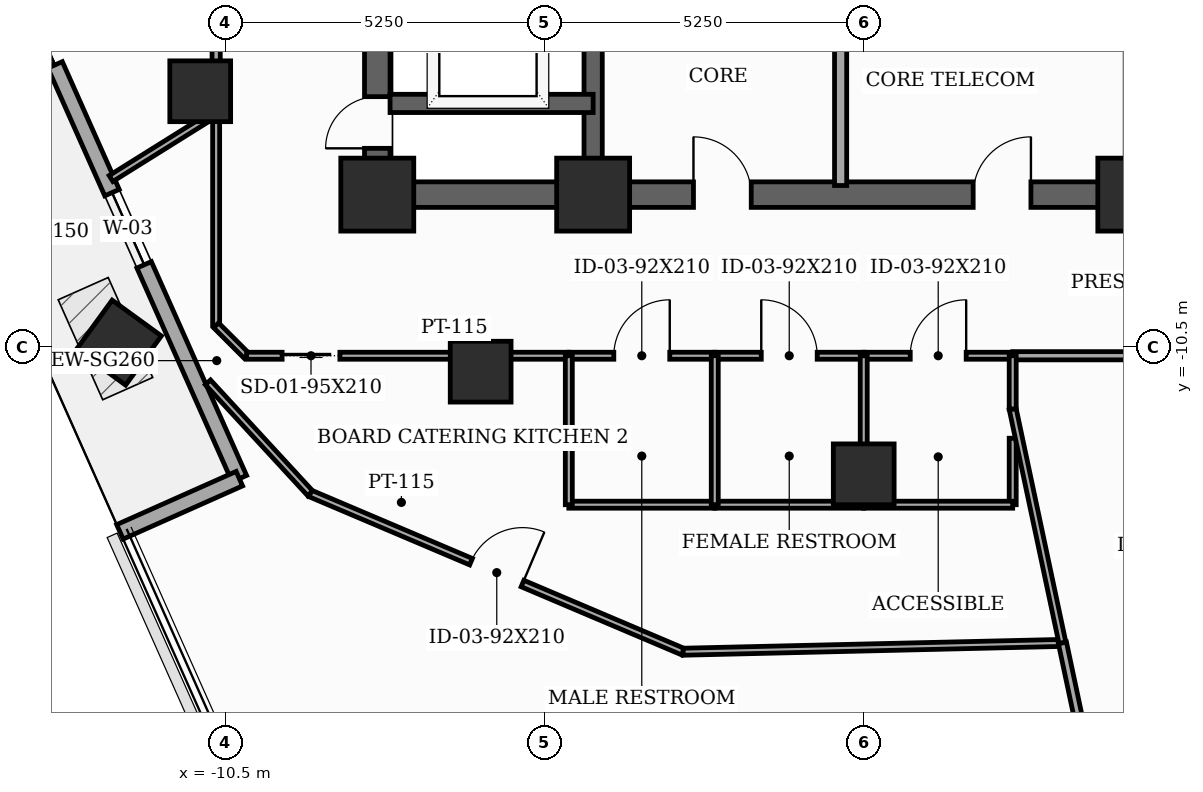
"""IFC4 building model, lengths in metres.
Left out: names, types, materials, properties, quantities, classifications, styles, units other than length and angle.
Written with IfcOpenShell. Run it as: python <this file> out.ifc"""

import sys

from ifc_helpers import new_model, si_unit, direction, frame, frame_2d, origin, origin_2d, place, context, subcontext, project, spatial, rectangle, extrude, element, fill, save


model = new_model("IFC4")
c1 = context("Model", 3, precision=1e-05, world=origin(), true_north=direction((0.0, 1.0)))
c2 = subcontext(c1, "Body", "Model", "MODEL_VIEW")
j1 = project(units=[si_unit("LENGTHUNIT", "METRE"), si_unit("PLANEANGLEUNIT", "RADIAN")], contexts=[c1])
p1 = place(None, origin())
s1 = spatial("IfcSite", under=j1, at=p1, CompositionType="ELEMENT")
p2 = place(p1, origin())
s2 = spatial("IfcBuilding", under=s1, at=p2, CompositionType="ELEMENT")
p3 = place(p2, frame((0.0, 0.0, 226.3)))
s3 = spatial("IfcBuildingStorey", under=s2, at=p3, CompositionType="ELEMENT", Elevation=226.3)
for number, where, z_axis, x_axis in (
    (1, (-8.0, -8.0, 0.0), (0.0, 0.0, 1.0), (1.0, 0.0, 0.0)),
    (2, (-4.45, -8.0, 0.0), (0.0, 0.0, 1.0), (1.0, 0.0, 0.0)),
    (3, (4.45, -8.0, 0.0), (0.0, 0.0, 1.0), (1.0, 0.0, 0.0)),
):
    element("IfcColumn", number, at=place(p3, frame(where, z_axis=z_axis, x_axis=x_axis)), inside=s3, PredefinedType="COLUMN", context=c2, shape_type="SweptSolid", body=[
        extrude(rectangle(XDim=1.2, YDim=1.2, at=origin_2d()), origin(), (0.0, 0.0, 1.0), 3.7),
    ])
for number, where, z_axis, x_axis in (
    (4, (-10.912, -6.3, 0.0), (0.0, 0.0, 1.0), (1.0, 0.0, 0.0)),
    (5, (-6.3, -10.912, 0.0), (0.0, 0.0, 1.0), (1.0, 0.0, 0.0)),
    (6, (0.0, -12.6, 0.0), (0.0, 0.0, 1.0), (1.0, 0.0, 0.0)),
    (7, (-12.25, -10.435, 0.0), (0.0, 0.0, 1.0), (0.588, 0.809, 0.0)),
):
    element("IfcColumn", number, at=place(p3, frame(where, z_axis=z_axis, x_axis=x_axis)), inside=s3, PredefinedType="COLUMN", context=c2, shape_type="SweptSolid", body=[
        extrude(rectangle(XDim=1.0, YDim=1.0, at=origin_2d()), origin(), (0.0, 0.0, 1.0), 3.7),
    ])
p4 = place(p3, frame((-14.661, -2.806, 0.0), z_axis=(0.0, 0.0, 1.0), x_axis=(0.406736136359, -0.913545683247, 0.0)))
e8 = element("IfcWall", 8, at=p4, inside=s3, PredefinedType="SOLIDWALL", context=c2, shape_type="SweptSolid", body=[
    extrude(rectangle(XDim=10.8, YDim=0.26, at=frame_2d((5.4, 0.0))), origin(), (0.0, 0.0, 1.0), 3.5),
])
p5 = place(p4, frame((1.75, 0.0, 0.0)))
e9 = element("IfcOpeningElement", 9, at=p5, cuts=e8, PredefinedType="OPENING", context=c2, shape_type="SweptSolid", body=[
    extrude(rectangle(XDim=1.6, YDim=2.08, at=frame_2d((0.8, 1.04))), frame((0.0, 0.14, 0.0), z_axis=(0.0, -1.0, 0.0), x_axis=(1.0, 0.0, 0.0)), (0.0, 0.0, 1.0), 0.28),
])
p6 = place(p4, frame((5.65, 0.0, 0.85)))
e10 = element("IfcOpeningElement", 10, at=p6, cuts=e8, PredefinedType="OPENING", context=c2, shape_type="SweptSolid", body=[
    extrude(rectangle(XDim=1.3, YDim=1.25, at=frame_2d((0.65, 0.625))), frame((0.0, 0.14, 0.0), z_axis=(0.0, -1.0, 0.0), x_axis=(1.0, 0.0, 0.0)), (0.0, 0.0, 1.0), 0.28),
])
p7 = place(p3, frame((-10.268, -12.672, 0.0), z_axis=(0.0, 0.0, 1.0), x_axis=(-0.913539751874, -0.406749458199, 0.0)))
e11 = element("IfcWall", 11, at=p7, inside=s3, PredefinedType="SOLIDWALL", context=c2, shape_type="SweptSolid", body=[
    extrude(rectangle(XDim=2.15, YDim=0.26, at=frame_2d((1.075, 0.0))), origin(), (0.0, 0.0, 1.0), 3.5),
])
p8 = place(p3, frame((-8.0, -8.0, 0.0), z_axis=(0.0, 0.0, 1.0), x_axis=(0.0, 1.0, 0.0)))
e12 = element("IfcWall", 12, at=p8, inside=s3, PredefinedType="SHEAR", context=c2, shape_type="SweptSolid", body=[
    extrude(rectangle(XDim=16.0, YDim=0.42, at=frame_2d((8.0, 0.0))), origin(), (0.0, 0.0, 1.0), 3.5),
])
p9 = place(p8, frame((0.761, 0.0, 0.0)))
e13 = element("IfcOpeningElement", 13, at=p9, cuts=e12, PredefinedType="OPENING", context=c2, shape_type="SweptSolid", body=[
    extrude(rectangle(XDim=0.85, YDim=2.02, at=frame_2d((0.425, 1.01))), frame((0.0, 0.22, 0.0), z_axis=(0.0, -1.0, 0.0), x_axis=(1.0, 0.0, 0.0)), (0.0, 0.0, 1.0), 0.44),
])
p10 = place(p8, frame((5.35, 0.0, 0.0)))
e14 = element("IfcOpeningElement", 14, at=p10, cuts=e12, PredefinedType="OPENING", context=c2, shape_type="SweptSolid", body=[
    extrude(rectangle(XDim=1.05, YDim=2.15, at=frame_2d((0.525, 1.075))), frame((0.0, 0.22, 0.0), z_axis=(0.0, -1.0, 0.0), x_axis=(1.0, 0.0, 0.0)), (0.0, 0.0, 1.0), 0.44),
])
p11 = place(p3, frame((-8.0, -8.0, 0.0), z_axis=(0.0, 0.0, 1.0), x_axis=(1.0, 0.0, 0.0)))
e15 = element("IfcWall", 15, at=p11, inside=s3, PredefinedType="SHEAR", context=c2, shape_type="SweptSolid", body=[
    extrude(rectangle(XDim=16.0, YDim=0.42, at=frame_2d((8.0, 0.0))), origin(), (0.0, 0.0, 1.0), 3.5),
])
p12 = place(p11, frame((5.2, 0.0, 0.0)))
e16 = element("IfcOpeningElement", 16, at=p12, cuts=e15, PredefinedType="OPENING", context=c2, shape_type="SweptSolid", body=[
    extrude(rectangle(XDim=0.95, YDim=2.1, at=frame_2d((0.475, 1.05))), frame((0.0, 0.22, 0.0), z_axis=(0.0, -1.0, 0.0), x_axis=(1.0, 0.0, 0.0)), (0.0, 0.0, 1.0), 0.44),
])
p13 = place(p11, frame((9.8, 0.0, 0.0)))
e17 = element("IfcOpeningElement", 17, at=p13, cuts=e15, PredefinedType="OPENING", context=c2, shape_type="SweptSolid", body=[
    extrude(rectangle(XDim=0.95, YDim=2.1, at=frame_2d((0.475, 1.05))), frame((0.0, 0.22, 0.0), z_axis=(0.0, -1.0, 0.0), x_axis=(1.0, 0.0, 0.0)), (0.0, 0.0, 1.0), 0.44),
])
p14 = place(p3, frame((-4.45, -7.79, 0.0), z_axis=(0.0, 0.0, 1.0), x_axis=(0.0, 1.0, 0.0)))
e18 = element("IfcWall", 18, at=p14, inside=s3, PredefinedType="SHEAR", context=c2, shape_type="SweptSolid", body=[
    extrude(rectangle(XDim=15.58, YDim=0.3, at=frame_2d((7.79, 0.0))), origin(), (0.0, 0.0, 1.0), 3.5),
])
p15 = place(p3, frame((-7.79, -6.5, 0.0), z_axis=(0.0, 0.0, 1.0), x_axis=(1.0, 0.0, 0.0)))
e19 = element("IfcWall", 19, at=p15, inside=s3, PredefinedType="SHEAR", context=c2, shape_type="SweptSolid", body=[
    extrude(rectangle(XDim=3.34, YDim=0.3, at=frame_2d((1.67, 0.0))), origin(), (0.0, 0.0, 1.0), 3.5),
])
p16 = place(p3, frame((-0.38, -7.85, 0.0), z_axis=(0.0, 0.0, 1.0), x_axis=(0.0, 1.0, 0.0)))
e20 = element("IfcWall", 20, at=p16, inside=s3, PredefinedType="SOLIDWALL", context=c2, shape_type="SweptSolid", body=[
    extrude(rectangle(XDim=2.95, YDim=0.2, at=frame_2d((1.475, 0.0))), origin(), (0.0, 0.0, 1.0), 2.885),
])
p17 = place(p3, frame((-10.65, -6.655, 0.0), z_axis=(0.0, 0.0, 1.0), x_axis=(0.0, -1.0, 0.0)))
e21 = element("IfcWall", 21, at=p17, inside=s3, PredefinedType="PARTITIONING", context=c2, shape_type="SweptSolid", body=[
    extrude(rectangle(XDim=3.495, YDim=0.115, at=frame_2d((1.748, 0.0))), origin(), (0.0, 0.0, 1.0), 2.885),
])
p18 = place(p3, frame((-10.65, -10.15, 0.0), z_axis=(0.0, 0.0, 1.0), x_axis=(0.707106781187, -0.707106781187, 0.0)))
e22 = element("IfcWall", 22, at=p18, inside=s3, PredefinedType="PARTITIONING", context=c2, shape_type="SweptSolid", body=[
    extrude(rectangle(XDim=0.707, YDim=0.115, at=frame_2d((0.354, 0.0))), origin(), (0.0, 0.0, 1.0), 3.5),
])
p19 = place(p3, frame((-10.15, -10.65, 0.0), z_axis=(0.0, 0.0, 1.0), x_axis=(1.0, 0.0, 0.0)))
e23 = element("IfcWall", 23, at=p19, inside=s3, PredefinedType="PARTITIONING", context=c2, shape_type="SweptSolid", body=[
    extrude(rectangle(XDim=5.3, YDim=0.115, at=frame_2d((2.65, 0.0))), origin(), (0.0, 0.0, 1.0), 2.885),
])
p20 = place(p19, frame((0.585, 0.0, 0.0)))
e24 = element("IfcOpeningElement", 24, at=p20, cuts=e23, PredefinedType="OPENING", context=c2, shape_type="SweptSolid", body=[
    extrude(rectangle(XDim=0.95, YDim=2.1, at=frame_2d((0.475, 1.05))), frame((0.0, 0.067, 0.0), z_axis=(0.0, -1.0, 0.0), x_axis=(1.0, 0.0, 0.0)), (0.0, 0.0, 1.0), 0.135),
])
p21 = place(p3, frame((-4.85, -10.65, 0.0), z_axis=(0.0, 0.0, 1.0), x_axis=(1.0, 0.0, 0.0)))
e25 = element("IfcWall", 25, at=p21, inside=s3, PredefinedType="PARTITIONING", context=c2, shape_type="SweptSolid", body=[
    extrude(rectangle(XDim=2.4, YDim=0.115, at=frame_2d((1.2, 0.0))), origin(), (0.0, 0.0, 1.0), 3.5),
])
p22 = place(p21, frame((0.74, 0.0, 0.0)))
e26 = element("IfcOpeningElement", 26, at=p22, cuts=e25, PredefinedType="OPENING", context=c2, shape_type="SweptSolid", body=[
    extrude(rectangle(XDim=0.92, YDim=2.1, at=frame_2d((0.46, 1.05))), frame((0.0, 0.067, 0.0), z_axis=(0.0, -1.0, 0.0), x_axis=(1.0, 0.0, 0.0)), (0.0, 0.0, 1.0), 0.135),
])
p23 = place(p3, frame((-2.45, -10.65, 0.0), z_axis=(0.0, 0.0, 1.0), x_axis=(1.0, 0.0, 0.0)))
e27 = element("IfcWall", 27, at=p23, inside=s3, PredefinedType="PARTITIONING", context=c2, shape_type="SweptSolid", body=[
    extrude(rectangle(XDim=2.45, YDim=0.115, at=frame_2d((1.225, 0.0))), origin(), (0.0, 0.0, 1.0), 2.885),
])
p24 = place(p23, frame((0.765, 0.0, 0.0)))
e28 = element("IfcOpeningElement", 28, at=p24, cuts=e27, PredefinedType="OPENING", context=c2, shape_type="SweptSolid", body=[
    extrude(rectangle(XDim=0.92, YDim=2.1, at=frame_2d((0.46, 1.05))), frame((0.0, 0.067, 0.0), z_axis=(0.0, -1.0, 0.0), x_axis=(1.0, 0.0, 0.0)), (0.0, 0.0, 1.0), 0.135),
])
p25 = place(p3, frame((0.0, -10.65, 0.0), z_axis=(0.0, 0.0, 1.0), x_axis=(1.0, 0.0, 0.0)))
e29 = element("IfcWall", 29, at=p25, inside=s3, PredefinedType="PARTITIONING", context=c2, shape_type="SweptSolid", body=[
    extrude(rectangle(XDim=2.45, YDim=0.115, at=frame_2d((1.225, 0.0))), origin(), (0.0, 0.0, 1.0), 3.5),
])
p26 = place(p25, frame((0.765, 0.0, 0.0)))
e30 = element("IfcOpeningElement", 30, at=p26, cuts=e29, PredefinedType="OPENING", context=c2, shape_type="SweptSolid", body=[
    extrude(rectangle(XDim=0.92, YDim=2.1, at=frame_2d((0.46, 1.05))), frame((0.0, 0.067, 0.0), z_axis=(0.0, -1.0, 0.0), x_axis=(1.0, 0.0, 0.0)), (0.0, 0.0, 1.0), 0.135),
])
p27 = place(p3, frame((2.45, -10.65, 0.0), z_axis=(0.0, 0.0, 1.0), x_axis=(1.0, 0.0, 0.0)))
e31 = element("IfcWall", 31, at=p27, inside=s3, PredefinedType="PARTITIONING", context=c2, shape_type="SweptSolid", body=[
    extrude(rectangle(XDim=7.7, YDim=0.135, at=frame_2d((3.85, 0.0))), origin(), (0.0, 0.0, 1.0), 2.885),
])
p28 = place(p3, frame((-10.65, -1.35, 0.0), z_axis=(0.0, 0.0, 1.0), x_axis=(0.0, -1.0, 0.0)))
e32 = element("IfcWall", 32, at=p28, inside=s3, PredefinedType="PARTITIONING", context=c2, shape_type="SweptSolid", body=[
    extrude(rectangle(XDim=5.305, YDim=0.135, at=frame_2d((2.652, 0.0))), origin(), (0.0, 0.0, 1.0), 2.885),
])
p29 = place(p28, frame((1.216, 0.0, 0.0)))
e33 = element("IfcOpeningElement", 33, at=p29, cuts=e32, PredefinedType="OPENING", context=c2, shape_type="SweptSolid", body=[
    extrude(rectangle(XDim=1.6, YDim=2.15, at=frame_2d((0.8, 1.075))), frame((0.0, 0.077, 0.0), z_axis=(0.0, -1.0, 0.0), x_axis=(1.0, 0.0, 0.0)), (0.0, 0.0, 1.0), 0.155),
])
p30 = place(p3, frame((-2.45, -13.1, 0.0), z_axis=(0.0, 0.0, 1.0), x_axis=(-1.0, 0.0, 0.0)))
e34 = element("IfcWall", 34, at=p30, inside=s3, PredefinedType="PARTITIONING", context=c2, shape_type="SweptSolid", body=[
    extrude(rectangle(XDim=2.4, YDim=0.115, at=frame_2d((1.2, 0.0))), origin(), (0.0, 0.0, 1.0), 3.5),
])
p31 = place(p3, frame((-4.85, -13.1, 0.0), z_axis=(0.0, 0.0, 1.0), x_axis=(0.0, 1.0, 0.0)))
e35 = element("IfcWall", 35, at=p31, inside=s3, PredefinedType="PARTITIONING", context=c2, shape_type="SweptSolid", body=[
    extrude(rectangle(XDim=2.45, YDim=0.115, at=frame_2d((1.225, 0.0))), origin(), (0.0, 0.0, 1.0), 2.885),
])
p32 = place(p3, frame((-10.785, -11.087, 0.0), z_axis=(0.0, 0.0, 1.0), x_axis=(0.677598765999, -0.735431786311, 0.0)))
e36 = element("IfcWall", 36, at=p32, inside=s3, PredefinedType="PARTITIONING", context=c2, shape_type="SweptSolid", body=[
    extrude(rectangle(XDim=2.486, YDim=0.115, at=frame_2d((1.243, 0.0))), origin(), (0.0, 0.0, 1.0), 3.5),
])
p33 = place(p3, frame((-9.1, -12.916, 0.0), z_axis=(0.0, 0.0, 1.0), x_axis=(0.920506675175, -0.390726836752, 0.0)))
e37 = element("IfcWall", 37, at=p33, inside=s3, PredefinedType="PARTITIONING", context=c2, shape_type="SweptSolid", body=[
    extrude(rectangle(XDim=6.659, YDim=0.115, at=frame_2d((3.33, 0.0))), origin(), (0.0, 0.0, 1.0), 2.985),
])
p34 = place(p33, frame((2.87, 0.0, 0.0)))
e38 = element("IfcOpeningElement", 38, at=p34, cuts=e37, PredefinedType="OPENING", context=c2, shape_type="SweptSolid", body=[
    extrude(rectangle(XDim=0.92, YDim=2.1, at=frame_2d((0.46, 1.05))), frame((0.0, 0.067, 0.0), z_axis=(0.0, -1.0, 0.0), x_axis=(1.0, 0.0, 0.0)), (0.0, 0.0, 1.0), 0.135),
])
p35 = place(p3, frame((-2.97, -15.518, 0.0), z_axis=(0.0, 0.0, 1.0), x_axis=(0.99972988351, 0.023241342836, 0.0)))
e39 = element("IfcWall", 39, at=p35, inside=s3, PredefinedType="PARTITIONING", context=c2, shape_type="SweptSolid", body=[
    extrude(rectangle(XDim=6.24, YDim=0.115, at=frame_2d((3.12, 0.0))), origin(), (0.0, 0.0, 1.0), 2.985),
])
p36 = place(p3, frame((0.0, -13.1, 0.0), z_axis=(0.0, 0.0, 1.0), x_axis=(-1.0, 0.0, 0.0)))
e40 = element("IfcWall", 40, at=p36, inside=s3, PredefinedType="PARTITIONING", context=c2, shape_type="SweptSolid", body=[
    extrude(rectangle(XDim=2.45, YDim=0.115, at=frame_2d((1.225, 0.0))), origin(), (0.0, 0.0, 1.0), 3.5),
])
p37 = place(p3, frame((2.45, -12.007, 0.0), z_axis=(0.0, 0.0, 1.0), x_axis=(0.0, -1.0, 0.0)))
e41 = element("IfcWall", 41, at=p37, inside=s3, PredefinedType="PARTITIONING", context=c2, shape_type="SweptSolid", body=[
    extrude(rectangle(XDim=1.093, YDim=0.115, at=frame_2d((0.547, 0.0))), origin(), (0.0, 0.0, 1.0), 2.885),
])
p38 = place(p3, frame((2.45, -13.1, 0.0), z_axis=(0.0, 0.0, 1.0), x_axis=(-1.0, 0.0, 0.0)))
e42 = element("IfcWall", 42, at=p38, inside=s3, PredefinedType="PARTITIONING", context=c2, shape_type="SweptSolid", body=[
    extrude(rectangle(XDim=2.45, YDim=0.115, at=frame_2d((1.225, 0.0))), origin(), (0.0, 0.0, 1.0), 2.985),
])
p39 = place(p3, frame((3.268, -15.373, 0.0), z_axis=(0.0, 0.0, 1.0), x_axis=(-0.208002774368, 0.978128235895, 0.0)))
e43 = element("IfcWall", 43, at=p39, inside=s3, PredefinedType="PARTITIONING", context=c2, shape_type="SweptSolid", body=[
    extrude(rectangle(XDim=3.933, YDim=0.115, at=frame_2d((1.967, 0.0))), origin(), (0.0, 0.0, 1.0), 2.885),
])
p40 = place(p3, frame((-10.65, -6.655, 0.0), z_axis=(0.0, 0.0, 1.0), x_axis=(-0.848119384497, -0.529805161962, 0.0)))
e44 = element("IfcWall", 44, at=p40, inside=s3, PredefinedType="PARTITIONING", context=c2, shape_type="SweptSolid", body=[
    extrude(rectangle(XDim=2.039, YDim=0.115, at=frame_2d((1.019, 0.0))), origin(), (0.0, 0.0, 1.0), 2.885),
])
p41 = place(p3, frame((-2.45, -13.1, 0.0), z_axis=(0.0, 0.0, 1.0), x_axis=(0.0, 1.0, 0.0)))
e45 = element("IfcWall", 45, at=p41, inside=s3, PredefinedType="PARTITIONING", context=c2, shape_type="SweptSolid", body=[
    extrude(rectangle(XDim=2.45, YDim=0.115, at=frame_2d((1.225, 0.0))), origin(), (0.0, 0.0, 1.0), 2.885),
])
p42 = place(p3, frame((4.645, -21.856, 0.0), z_axis=(0.0, 0.0, 1.0), x_axis=(-0.207797956892, 0.978171768715, 0.0)))
e46 = element("IfcWall", 46, at=p42, inside=s3, PredefinedType="PARTITIONING", context=c2, shape_type="SweptSolid", body=[
    extrude(rectangle(XDim=6.628, YDim=0.135, at=frame_2d((3.314, 0.0))), origin(), (0.0, 0.0, 1.0), 2.985),
])
p43 = place(p3, frame((0.0, -13.1, 0.0), z_axis=(0.0, 0.0, 1.0), x_axis=(0.0, 1.0, 0.0)))
e47 = element("IfcWall", 47, at=p43, inside=s3, PredefinedType="PARTITIONING", context=c2, shape_type="SweptSolid", body=[
    extrude(rectangle(XDim=2.45, YDim=0.115, at=frame_2d((1.225, 0.0))), origin(), (0.0, 0.0, 1.0), 2.885),
])
p44 = place(p3, frame((2.45, -11.526, 0.0), z_axis=(0.0, 0.0, 1.0), x_axis=(0.0, 1.0, 0.0)))
e48 = element("IfcWall", 48, at=p44, inside=s3, PredefinedType="PARTITIONING", context=c2, shape_type="SweptSolid", body=[
    extrude(rectangle(XDim=0.876, YDim=0.115, at=frame_2d((0.438, 0.0))), origin(), (0.0, 0.0, 1.0), 3.5),
])
p45 = place(p5, frame((1.6, 0.0, 0.0), z_axis=(0.0, 0.0, 1.0), x_axis=(-1.0, 0.0, 0.0)))
e49 = element("IfcDoor", 49, at=p45, inside=s3, OperationType="DOUBLE_DOOR_SLIDING", PredefinedType="DOOR", context=c2, shape_type="SweptSolid", body=[
    extrude(rectangle(XDim=1.6, YDim=2.08, at=frame_2d((0.8, 1.04))), frame((0.0, 0.025, 0.0), z_axis=(0.0, -1.0, 0.0), x_axis=(1.0, 0.0, 0.0)), (0.0, 0.0, 1.0), 0.05),
])
fill(e9, e49)
p46 = place(p6, origin())
e50 = element("IfcWindow", 50, at=p46, inside=s3, PartitioningType="SINGLE_PANEL", PredefinedType="WINDOW", context=c2, shape_type="SweptSolid", body=[
    extrude(rectangle(XDim=1.3, YDim=1.25, at=frame_2d((0.65, 0.625))), frame((0.0, 0.03, 0.0), z_axis=(0.0, -1.0, 0.0), x_axis=(1.0, 0.0, 0.0)), (0.0, 0.0, 1.0), 0.06),
])
fill(e10, e50)
p47 = place(p9, origin())
e51 = element("IfcDoor", 51, at=p47, inside=s3, OperationType="SINGLE_SWING_LEFT", PredefinedType="TRAPDOOR", context=c2, shape_type="SweptSolid", body=[
    extrude(rectangle(XDim=0.85, YDim=2.02, at=frame_2d((0.425, 1.01))), frame((0.0, 0.025, 0.0), z_axis=(0.0, -1.0, 0.0), x_axis=(1.0, 0.0, 0.0)), (0.0, 0.0, 1.0), 0.05),
])
fill(e13, e51)
p48 = place(p12, origin())
e52 = element("IfcDoor", 52, at=p48, inside=s3, OperationType="SINGLE_SWING_LEFT", PredefinedType="DOOR", context=c2, shape_type="SweptSolid", body=[
    extrude(rectangle(XDim=0.95, YDim=2.1, at=frame_2d((0.475, 1.05))), frame((0.0, 0.025, 0.0), z_axis=(0.0, -1.0, 0.0), x_axis=(1.0, 0.0, 0.0)), (0.0, 0.0, 1.0), 0.05),
])
fill(e16, e52)
p49 = place(p13, origin())
e53 = element("IfcDoor", 53, at=p49, inside=s3, OperationType="SINGLE_SWING_RIGHT", PredefinedType="DOOR", context=c2, shape_type="SweptSolid", body=[
    extrude(rectangle(XDim=0.95, YDim=2.1, at=frame_2d((0.475, 1.05))), frame((0.0, 0.025, 0.0), z_axis=(0.0, -1.0, 0.0), x_axis=(1.0, 0.0, 0.0)), (0.0, 0.0, 1.0), 0.05),
])
fill(e17, e53)
p50 = place(p20, origin())
e54 = element("IfcDoor", 54, at=p50, inside=s3, OperationType="SLIDING_TO_LEFT", PredefinedType="DOOR", context=c2, shape_type="SweptSolid", body=[
    extrude(rectangle(XDim=0.95, YDim=2.1, at=frame_2d((0.475, 1.05))), frame((0.0, 0.025, 0.0), z_axis=(0.0, -1.0, 0.0), x_axis=(1.0, 0.0, 0.0)), (0.0, 0.0, 1.0), 0.05),
])
fill(e24, e54)
p51 = place(p22, origin())
e55 = element("IfcDoor", 55, at=p51, inside=s3, OperationType="SINGLE_SWING_RIGHT", PredefinedType="DOOR", context=c2, shape_type="SweptSolid", body=[
    extrude(rectangle(XDim=0.92, YDim=2.1, at=frame_2d((0.46, 1.05))), frame((0.0, 0.025, 0.0), z_axis=(0.0, -1.0, 0.0), x_axis=(1.0, 0.0, 0.0)), (0.0, 0.0, 1.0), 0.05),
])
fill(e26, e55)
p52 = place(p24, origin())
e56 = element("IfcDoor", 56, at=p52, inside=s3, OperationType="SINGLE_SWING_LEFT", PredefinedType="DOOR", context=c2, shape_type="SweptSolid", body=[
    extrude(rectangle(XDim=0.92, YDim=2.1, at=frame_2d((0.46, 1.05))), frame((0.0, 0.025, 0.0), z_axis=(0.0, -1.0, 0.0), x_axis=(1.0, 0.0, 0.0)), (0.0, 0.0, 1.0), 0.05),
])
fill(e28, e56)
p53 = place(p26, origin())
e57 = element("IfcDoor", 57, at=p53, inside=s3, OperationType="SINGLE_SWING_RIGHT", PredefinedType="DOOR", context=c2, shape_type="SweptSolid", body=[
    extrude(rectangle(XDim=0.92, YDim=2.1, at=frame_2d((0.46, 1.05))), frame((0.0, 0.025, 0.0), z_axis=(0.0, -1.0, 0.0), x_axis=(1.0, 0.0, 0.0)), (0.0, 0.0, 1.0), 0.05),
])
fill(e30, e57)
p54 = place(p34, origin())
e58 = element("IfcDoor", 58, at=p54, inside=s3, OperationType="SINGLE_SWING_RIGHT", PredefinedType="DOOR", context=c2, shape_type="SweptSolid", body=[
    extrude(rectangle(XDim=0.92, YDim=2.1, at=frame_2d((0.46, 1.05))), frame((0.0, 0.025, 0.0), z_axis=(0.0, -1.0, 0.0), x_axis=(1.0, 0.0, 0.0)), (0.0, 0.0, 1.0), 0.05),
])
fill(e38, e58)
save(model, sys.argv[1])
